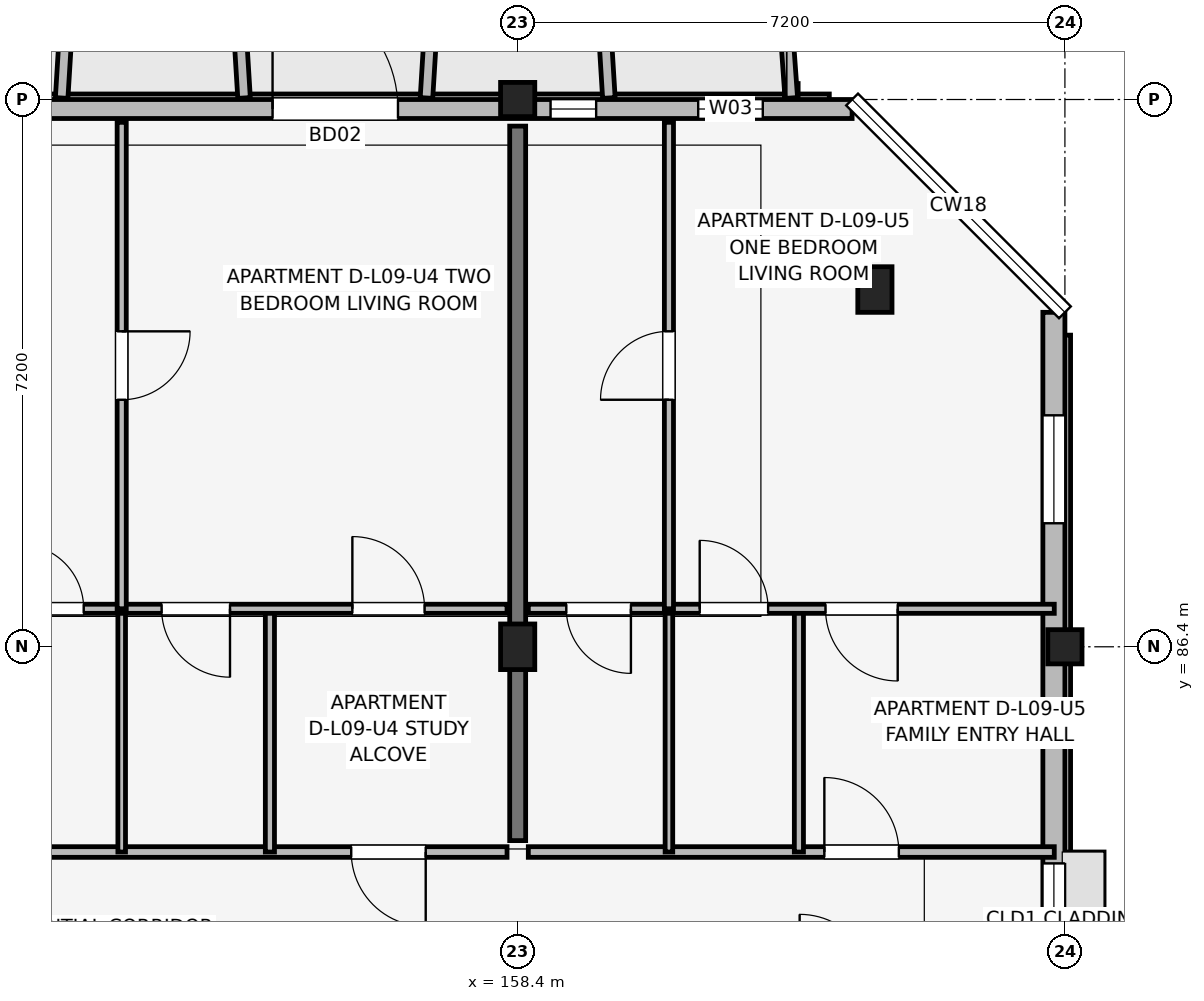
"""IFC4 building model, lengths in metres.
Left out: names, types, materials, properties, quantities, classifications, styles, units other than length and angle.
Written with IfcOpenShell. Run it as: python <this file> out.ifc"""

import sys

from ifc_helpers import new_model, si_unit, direction, frame, frame_2d, origin, origin_2d, place, context, subcontext, project, spatial, rectangle, extrude, element, fill, save


model = new_model("IFC4")
c1 = context("Model", 3, precision=1e-05, world=origin(), true_north=direction((0.0, 1.0)))
c2 = subcontext(c1, "Body", "Model", "MODEL_VIEW")
j1 = project(units=[si_unit("LENGTHUNIT", "METRE"), si_unit("PLANEANGLEUNIT", "RADIAN")], contexts=[c1])
p1 = place(None, origin())
s1 = spatial("IfcSite", under=j1, at=p1, CompositionType="ELEMENT")
p2 = place(p1, origin())
s2 = spatial("IfcBuilding", under=s1, at=p2, CompositionType="ELEMENT")
p3 = place(p2, frame((0.0, 0.0, 30.75)))
s3 = spatial("IfcBuildingStorey", under=s2, at=p3, CompositionType="ELEMENT", Elevation=30.75)
p4 = place(p3, frame((158.4, 86.4, 0.0), z_axis=(0.0, 0.0, 1.0), x_axis=(1.0, 0.0, 0.0)))
e1 = element("IfcColumn", 1, at=p4, inside=s3, PredefinedType="COLUMN", context=c2, shape_type="SweptSolid", body=[
    extrude(rectangle(XDim=0.45, YDim=0.6, at=origin_2d()), origin(), (0.0, 0.0, 1.0), 3.15),
])
for number, where, z_axis, x_axis in (
    (2, (158.4, 93.6, 0.0), (0.0, 0.0, 1.0), (1.0, 0.0, 0.0)),
    (3, (165.6, 86.4, 0.0), (0.0, 0.0, 1.0), (1.0, 0.0, 0.0)),
):
    element("IfcColumn", number, at=place(p3, frame(where, z_axis=z_axis, x_axis=x_axis)), inside=s3, PredefinedType="COLUMN", context=c2, shape_type="SweptSolid", body=[
        extrude(rectangle(XDim=0.45, YDim=0.45, at=origin_2d()), origin(), (0.0, 0.0, 1.0), 3.15),
    ])
p5 = place(p3, frame((163.1, 91.1, 0.0), z_axis=(0.0, 0.0, 1.0), x_axis=(1.0, 0.0, 0.0)))
e4 = element("IfcColumn", 4, at=p5, inside=s3, PredefinedType="COLUMN", context=c2, shape_type="SweptSolid", body=[
    extrude(rectangle(XDim=0.45, YDim=0.6, at=origin_2d()), origin(), (0.0, 0.0, 1.0), 3.15),
])
p6 = place(p3, frame((158.4, 83.85, 0.0), z_axis=(0.0, 0.0, 1.0), x_axis=(0.0, 1.0, 0.0)))
e5 = element("IfcWall", 5, at=p6, inside=s3, PredefinedType="SHEAR", context=c2, shape_type="SweptSolid", body=[
    extrude(rectangle(XDim=9.4, YDim=0.21, at=frame_2d((4.7, 0.0))), origin(), (0.0, 0.0, 1.0), 3.15),
])
p7 = place(p3, frame((165.455, 74.8, 0.0), z_axis=(0.0, 0.0, 1.0), x_axis=(0.0, 1.0, 0.0)))
e6 = element("IfcWall", 6, at=p7, inside=s3, PredefinedType="SOLIDWALL", context=c2, shape_type="SweptSolid", body=[
    extrude(rectangle(XDim=16.0, YDim=0.29, at=frame_2d((8.0, 0.0))), origin(), (0.0, 0.0, 1.0), 2.48),
])
p8 = place(p7, frame((7.25, 0.0, 1.05)))
e7 = element("IfcOpeningElement", 7, at=p8, cuts=e6, PredefinedType="OPENING", context=c2, shape_type="SweptSolid", body=[
    extrude(rectangle(XDim=1.5, YDim=1.15, at=frame_2d((0.75, 0.575))), frame((0.0, 0.155, 0.0), z_axis=(0.0, -1.0, 0.0), x_axis=(1.0, 0.0, 0.0)), (0.0, 0.0, 1.0), 0.31),
])
p9 = place(p7, frame((13.225, 0.0, 0.75)))
e8 = element("IfcOpeningElement", 8, at=p9, cuts=e6, PredefinedType="OPENING", context=c2, shape_type="SweptSolid", body=[
    extrude(rectangle(XDim=1.42, YDim=1.6, at=frame_2d((0.71, 0.8))), frame((0.0, 0.155, 0.0), z_axis=(0.0, -1.0, 0.0), x_axis=(1.0, 0.0, 0.0)), (0.0, 0.0, 1.0), 0.31),
])
p10 = place(p3, frame((162.8, 93.475, 0.0), z_axis=(0.0, 0.0, 1.0), x_axis=(-1.0, 0.0, 0.0)))
e9 = element("IfcWall", 9, at=p10, inside=s3, PredefinedType="SOLIDWALL", context=c2, shape_type="SweptSolid", body=[
    extrude(rectangle(XDim=30.4, YDim=0.25, at=frame_2d((15.2, 0.0))), origin(), (0.0, 0.0, 1.0), 2.48),
])
p11 = place(p10, frame((22.1, 0.0, 0.0), z_axis=(0.0, 0.0, 1.0), x_axis=(-1.0, 0.0, 0.0)))
e10 = element("IfcOpeningElement", 10, at=p11, cuts=e9, PredefinedType="OPENING", context=c2, shape_type="SweptSolid", body=[
    extrude(rectangle(XDim=1.8, YDim=2.15, at=frame_2d((0.9, 1.075))), frame((0.0, 0.135, 0.0), z_axis=(0.0, -1.0, 0.0), x_axis=(1.0, 0.0, 0.0)), (0.0, 0.0, 1.0), 0.27),
])
p12 = place(p10, frame((7.625, 0.0, 0.0), z_axis=(0.0, 0.0, 1.0), x_axis=(-1.0, 0.0, 0.0)))
e11 = element("IfcOpeningElement", 11, at=p12, cuts=e9, PredefinedType="OPENING", context=c2, shape_type="SweptSolid", body=[
    extrude(rectangle(XDim=1.65, YDim=2.15, at=frame_2d((0.825, 1.075))), frame((0.0, 0.135, 0.0), z_axis=(0.0, -1.0, 0.0), x_axis=(1.0, 0.0, 0.0)), (0.0, 0.0, 1.0), 0.27),
])
p13 = place(p10, frame((27.97, 0.0, 0.7)))
e12 = element("IfcOpeningElement", 12, at=p13, cuts=e9, PredefinedType="OPENING", context=c2, shape_type="SweptSolid", body=[
    extrude(rectangle(XDim=1.46, YDim=1.55, at=frame_2d((0.73, 0.775))), frame((0.0, 0.135, 0.0), z_axis=(0.0, -1.0, 0.0), x_axis=(1.0, 0.0, 0.0)), (0.0, 0.0, 1.0), 0.27),
])
p14 = place(p10, frame((26.433, 0.0, 0.75)))
e13 = element("IfcOpeningElement", 13, at=p14, cuts=e9, PredefinedType="OPENING", context=c2, shape_type="SweptSolid", body=[
    extrude(rectangle(XDim=0.6, YDim=1.25, at=frame_2d((0.3, 0.625))), frame((0.0, 0.135, 0.0), z_axis=(0.0, -1.0, 0.0), x_axis=(1.0, 0.0, 0.0)), (0.0, 0.0, 1.0), 0.27),
])
p15 = place(p10, frame((24.968, 0.0, 0.75)))
e14 = element("IfcOpeningElement", 14, at=p15, cuts=e9, PredefinedType="OPENING", context=c2, shape_type="SweptSolid", body=[
    extrude(rectangle(XDim=0.6, YDim=1.25, at=frame_2d((0.3, 0.625))), frame((0.0, 0.135, 0.0), z_axis=(0.0, -1.0, 0.0), x_axis=(1.0, 0.0, 0.0)), (0.0, 0.0, 1.0), 0.27),
])
p16 = place(p10, frame((15.61, 0.0, 0.7)))
e15 = element("IfcOpeningElement", 15, at=p16, cuts=e9, PredefinedType="OPENING", context=c2, shape_type="SweptSolid", body=[
    extrude(rectangle(XDim=1.58, YDim=1.6, at=frame_2d((0.79, 0.8))), frame((0.0, 0.135, 0.0), z_axis=(0.0, -1.0, 0.0), x_axis=(1.0, 0.0, 0.0)), (0.0, 0.0, 1.0), 0.27),
])
p17 = place(p10, frame((12.945, 0.0, 0.75)))
e16 = element("IfcOpeningElement", 16, at=p17, cuts=e9, PredefinedType="OPENING", context=c2, shape_type="SweptSolid", body=[
    extrude(rectangle(XDim=1.46, YDim=1.55, at=frame_2d((0.73, 0.775))), frame((0.0, 0.135, 0.0), z_axis=(0.0, -1.0, 0.0), x_axis=(1.0, 0.0, 0.0)), (0.0, 0.0, 1.0), 0.27),
])
p18 = place(p10, frame((10.567, 0.0, 0.75)))
e17 = element("IfcOpeningElement", 17, at=p18, cuts=e9, PredefinedType="OPENING", context=c2, shape_type="SweptSolid", body=[
    extrude(rectangle(XDim=0.6, YDim=1.25, at=frame_2d((0.3, 0.625))), frame((0.0, 0.135, 0.0), z_axis=(0.0, -1.0, 0.0), x_axis=(1.0, 0.0, 0.0)), (0.0, 0.0, 1.0), 0.27),
])
p19 = place(p10, frame((3.367, 0.0, 0.75)))
e18 = element("IfcOpeningElement", 18, at=p19, cuts=e9, PredefinedType="OPENING", context=c2, shape_type="SweptSolid", body=[
    extrude(rectangle(XDim=0.6, YDim=1.25, at=frame_2d((0.3, 0.625))), frame((0.0, 0.135, 0.0), z_axis=(0.0, -1.0, 0.0), x_axis=(1.0, 0.0, 0.0)), (0.0, 0.0, 1.0), 0.27),
])
p20 = place(p10, frame((1.175, 0.0, 0.75)))
e19 = element("IfcOpeningElement", 19, at=p20, cuts=e9, PredefinedType="OPENING", context=c2, shape_type="SweptSolid", body=[
    extrude(rectangle(XDim=0.85, YDim=1.4, at=frame_2d((0.425, 0.7))), frame((0.0, 0.135, 0.0), z_axis=(0.0, -1.0, 0.0), x_axis=(1.0, 0.0, 0.0)), (0.0, 0.0, 1.0), 0.27),
])
for number, where, z_axis, x_axis in (
    (20, (152.4, 93.62, 0.0), (0.0, 0.0, 1.0), (0.061, 0.998, 0.0)),
    (21, (154.8, 93.62, 0.0), (0.0, 0.0, 1.0), (-0.061, 0.998, 0.0)),
    (22, (157.2, 93.62, 0.0), (0.0, 0.0, 1.0), (0.061, 0.998, 0.0)),
):
    element("IfcWall", number, at=place(p3, frame(where, z_axis=z_axis, x_axis=x_axis)), inside=s3, PredefinedType="ELEMENTEDWALL", context=c2, shape_type="SweptSolid", body=[
        extrude(rectangle(XDim=1.964, YDim=0.165, at=frame_2d((0.982, 0.0))), origin(), (0.0, 0.0, 1.0), 2.58),
    ])
p21 = place(p3, frame((159.6, 93.62, 0.0), z_axis=(0.0, 0.0, 1.0), x_axis=(-0.061170732449, 0.998127317276, 0.0)))
e23 = element("IfcWall", 23, at=p21, inside=s3, PredefinedType="ELEMENTEDWALL", context=c2, shape_type="SweptSolid", body=[
    extrude(rectangle(XDim=1.964, YDim=0.165, at=frame_2d((0.982, 0.0))), origin(), (0.0, 0.0, 1.0), 2.95),
])
p22 = place(p3, frame((162.0, 93.62, 0.0), z_axis=(0.0, 0.0, 1.0), x_axis=(-0.071194071069, 0.997462482625, 0.0)))
e24 = element("IfcWall", 24, at=p22, inside=s3, PredefinedType="ELEMENTEDWALL", context=c2, shape_type="SweptSolid", body=[
    extrude(rectangle(XDim=1.965, YDim=0.165, at=frame_2d((0.982, 0.0))), origin(), (0.0, 0.0, 1.0), 2.95),
])
p23 = place(p3, frame((151.34, 83.7, 0.0), z_axis=(0.0, 0.0, 1.0), x_axis=(1.0, 0.0, 0.0)))
e25 = element("IfcWall", 25, at=p23, inside=s3, PredefinedType="PARTITIONING", context=c2, shape_type="SweptSolid", body=[
    extrude(rectangle(XDim=6.92, YDim=0.14, at=frame_2d((3.46, 0.0))), origin(), (0.0, 0.0, 1.0), 2.38),
])
p24 = place(p23, frame((5.85, 0.0, 0.0), z_axis=(0.0, 0.0, 1.0), x_axis=(-1.0, 0.0, 0.0)))
e26 = element("IfcOpeningElement", 26, at=p24, cuts=e25, PredefinedType="OPENING", context=c2, shape_type="SweptSolid", body=[
    extrude(rectangle(XDim=0.98, YDim=2.1, at=frame_2d((0.49, 1.05))), frame((0.0, 0.08, 0.0), z_axis=(0.0, -1.0, 0.0), x_axis=(1.0, 0.0, 0.0)), (0.0, 0.0, 1.0), 0.16),
])
p25 = place(p3, frame((153.19, 83.7, 0.0), z_axis=(0.0, 0.0, 1.0), x_axis=(0.0, 1.0, 0.0)))
e27 = element("IfcWall", 27, at=p25, inside=s3, PredefinedType="PARTITIONING", context=c2, shape_type="SweptSolid", body=[
    extrude(rectangle(XDim=3.2, YDim=0.1, at=frame_2d((1.6, 0.0))), origin(), (0.0, 0.0, 1.0), 2.38),
])
p26 = place(p3, frame((155.14, 83.7, 0.0), z_axis=(0.0, 0.0, 1.0), x_axis=(0.0, 1.0, 0.0)))
e28 = element("IfcWall", 28, at=p26, inside=s3, PredefinedType="PARTITIONING", context=c2, shape_type="SweptSolid", body=[
    extrude(rectangle(XDim=3.2, YDim=0.12, at=frame_2d((1.6, 0.0))), origin(), (0.0, 0.0, 1.0), 2.38),
])
p27 = place(p3, frame((151.34, 86.9, 0.0), z_axis=(0.0, 0.0, 1.0), x_axis=(1.0, 0.0, 0.0)))
e29 = element("IfcWall", 29, at=p27, inside=s3, PredefinedType="PARTITIONING", context=c2, shape_type="SweptSolid", body=[
    extrude(rectangle(XDim=6.92, YDim=0.12, at=frame_2d((3.46, 0.0))), origin(), (0.0, 0.0, 1.0), 2.38),
])
p28 = place(p27, frame((0.5, 0.0, 0.0)))
e30 = element("IfcOpeningElement", 30, at=p28, cuts=e29, PredefinedType="OPENING", context=c2, shape_type="SweptSolid", body=[
    extrude(rectangle(XDim=0.85, YDim=2.08, at=frame_2d((0.425, 1.04))), frame((0.0, 0.07, 0.0), z_axis=(0.0, -1.0, 0.0), x_axis=(1.0, 0.0, 0.0)), (0.0, 0.0, 1.0), 0.14),
])
p29 = place(p27, frame((3.275, 0.0, 0.0), z_axis=(0.0, 0.0, 1.0), x_axis=(-1.0, 0.0, 0.0)))
e31 = element("IfcOpeningElement", 31, at=p29, cuts=e29, PredefinedType="OPENING", context=c2, shape_type="SweptSolid", body=[
    extrude(rectangle(XDim=0.9, YDim=2.08, at=frame_2d((0.45, 1.04))), frame((0.0, 0.07, 0.0), z_axis=(0.0, -1.0, 0.0), x_axis=(1.0, 0.0, 0.0)), (0.0, 0.0, 1.0), 0.14),
])
p30 = place(p27, frame((4.885, 0.0, 0.0)))
e32 = element("IfcOpeningElement", 32, at=p30, cuts=e29, PredefinedType="OPENING", context=c2, shape_type="SweptSolid", body=[
    extrude(rectangle(XDim=0.95, YDim=2.08, at=frame_2d((0.475, 1.04))), frame((0.0, 0.07, 0.0), z_axis=(0.0, -1.0, 0.0), x_axis=(1.0, 0.0, 0.0)), (0.0, 0.0, 1.0), 0.14),
])
p31 = place(p3, frame((153.19, 86.9, 0.0), z_axis=(0.0, 0.0, 1.0), x_axis=(0.0, 1.0, 0.0)))
e33 = element("IfcWall", 33, at=p31, inside=s3, PredefinedType="PARTITIONING", context=c2, shape_type="SweptSolid", body=[
    extrude(rectangle(XDim=6.4, YDim=0.12, at=frame_2d((3.2, 0.0))), origin(), (0.0, 0.0, 1.0), 2.38),
])
p32 = place(p31, frame((3.65, 0.0, 0.0), z_axis=(0.0, 0.0, 1.0), x_axis=(-1.0, 0.0, 0.0)))
e34 = element("IfcOpeningElement", 34, at=p32, cuts=e33, PredefinedType="OPENING", context=c2, shape_type="SweptSolid", body=[
    extrude(rectangle(XDim=0.9, YDim=2.08, at=frame_2d((0.45, 1.04))), frame((0.0, 0.07, 0.0), z_axis=(0.0, -1.0, 0.0), x_axis=(1.0, 0.0, 0.0)), (0.0, 0.0, 1.0), 0.14),
])
p33 = place(p3, frame((158.54, 83.7, 0.0), z_axis=(0.0, 0.0, 1.0), x_axis=(1.0, 0.0, 0.0)))
e35 = element("IfcWall", 35, at=p33, inside=s3, PredefinedType="PARTITIONING", context=c2, shape_type="SweptSolid", body=[
    extrude(rectangle(XDim=6.92, YDim=0.14, at=frame_2d((3.46, 0.0))), origin(), (0.0, 0.0, 1.0), 2.38),
])
p34 = place(p33, frame((3.895, 0.0, 0.0)))
e36 = element("IfcOpeningElement", 36, at=p34, cuts=e35, PredefinedType="OPENING", context=c2, shape_type="SweptSolid", body=[
    extrude(rectangle(XDim=0.98, YDim=2.1, at=frame_2d((0.49, 1.05))), frame((0.0, 0.08, 0.0), z_axis=(0.0, -1.0, 0.0), x_axis=(1.0, 0.0, 0.0)), (0.0, 0.0, 1.0), 0.16),
])
p35 = place(p3, frame((160.39, 83.7, 0.0), z_axis=(0.0, 0.0, 1.0), x_axis=(0.0, 1.0, 0.0)))
e37 = element("IfcWall", 37, at=p35, inside=s3, PredefinedType="PARTITIONING", context=c2, shape_type="SweptSolid", body=[
    extrude(rectangle(XDim=3.2, YDim=0.1, at=frame_2d((1.6, 0.0))), origin(), (0.0, 0.0, 1.0), 2.38),
])
p36 = place(p3, frame((162.1, 83.7, 0.0), z_axis=(0.0, 0.0, 1.0), x_axis=(0.0, 1.0, 0.0)))
e38 = element("IfcWall", 38, at=p36, inside=s3, PredefinedType="PARTITIONING", context=c2, shape_type="SweptSolid", body=[
    extrude(rectangle(XDim=3.2, YDim=0.12, at=frame_2d((1.6, 0.0))), origin(), (0.0, 0.0, 1.0), 2.38),
])
p37 = place(p3, frame((158.54, 86.9, 0.0), z_axis=(0.0, 0.0, 1.0), x_axis=(1.0, 0.0, 0.0)))
e39 = element("IfcWall", 39, at=p37, inside=s3, PredefinedType="PARTITIONING", context=c2, shape_type="SweptSolid", body=[
    extrude(rectangle(XDim=6.92, YDim=0.12, at=frame_2d((3.46, 0.0))), origin(), (0.0, 0.0, 1.0), 2.38),
])
p38 = place(p37, frame((1.35, 0.0, 0.0), z_axis=(0.0, 0.0, 1.0), x_axis=(-1.0, 0.0, 0.0)))
e40 = element("IfcOpeningElement", 40, at=p38, cuts=e39, PredefinedType="OPENING", context=c2, shape_type="SweptSolid", body=[
    extrude(rectangle(XDim=0.85, YDim=2.08, at=frame_2d((0.425, 1.04))), frame((0.0, 0.07, 0.0), z_axis=(0.0, -1.0, 0.0), x_axis=(1.0, 0.0, 0.0)), (0.0, 0.0, 1.0), 0.14),
])
p39 = place(p37, frame((2.255, 0.0, 0.0)))
e41 = element("IfcOpeningElement", 41, at=p39, cuts=e39, PredefinedType="OPENING", context=c2, shape_type="SweptSolid", body=[
    extrude(rectangle(XDim=0.9, YDim=2.08, at=frame_2d((0.45, 1.04))), frame((0.0, 0.07, 0.0), z_axis=(0.0, -1.0, 0.0), x_axis=(1.0, 0.0, 0.0)), (0.0, 0.0, 1.0), 0.14),
])
p40 = place(p37, frame((4.86, 0.0, 0.0), z_axis=(0.0, 0.0, 1.0), x_axis=(-1.0, 0.0, 0.0)))
e42 = element("IfcOpeningElement", 42, at=p40, cuts=e39, PredefinedType="OPENING", context=c2, shape_type="SweptSolid", body=[
    extrude(rectangle(XDim=0.95, YDim=2.08, at=frame_2d((0.475, 1.04))), frame((0.0, 0.07, 0.0), z_axis=(0.0, -1.0, 0.0), x_axis=(1.0, 0.0, 0.0)), (0.0, 0.0, 1.0), 0.14),
])
p41 = place(p3, frame((160.39, 86.9, 0.0), z_axis=(0.0, 0.0, 1.0), x_axis=(0.0, 1.0, 0.0)))
e43 = element("IfcWall", 43, at=p41, inside=s3, PredefinedType="PARTITIONING", context=c2, shape_type="SweptSolid", body=[
    extrude(rectangle(XDim=6.4, YDim=0.12, at=frame_2d((3.2, 0.0))), origin(), (0.0, 0.0, 1.0), 2.38),
])
p42 = place(p41, frame((2.75, 0.0, 0.0)))
e44 = element("IfcOpeningElement", 44, at=p42, cuts=e43, PredefinedType="OPENING", context=c2, shape_type="SweptSolid", body=[
    extrude(rectangle(XDim=0.9, YDim=2.08, at=frame_2d((0.45, 1.04))), frame((0.0, 0.07, 0.0), z_axis=(0.0, -1.0, 0.0), x_axis=(1.0, 0.0, 0.0)), (0.0, 0.0, 1.0), 0.14),
])
p43 = place(p12, origin())
e45 = element("IfcDoor", 45, at=p43, inside=s3, OperationType="SINGLE_SWING_RIGHT", PredefinedType="DOOR", context=c2, shape_type="SweptSolid", body=[
    extrude(rectangle(XDim=1.65, YDim=2.15, at=frame_2d((0.825, 1.075))), frame((0.0, 0.025, 0.0), z_axis=(0.0, -1.0, 0.0), x_axis=(1.0, 0.0, 0.0)), (0.0, 0.0, 1.0), 0.05),
])
fill(e11, e45)
p44 = place(p19, origin())
e46 = element("IfcWindow", 46, at=p44, inside=s3, PartitioningType="SINGLE_PANEL", PredefinedType="WINDOW", context=c2, shape_type="SweptSolid", body=[
    extrude(rectangle(XDim=0.6, YDim=1.25, at=frame_2d((0.3, 0.625))), frame((0.0, 0.03, 0.0), z_axis=(0.0, -1.0, 0.0), x_axis=(1.0, 0.0, 0.0)), (0.0, 0.0, 1.0), 0.06),
])
fill(e18, e46)
p45 = place(p20, origin())
e47 = element("IfcWindow", 47, at=p45, inside=s3, PartitioningType="SINGLE_PANEL", PredefinedType="WINDOW", context=c2, shape_type="SweptSolid", body=[
    extrude(rectangle(XDim=0.85, YDim=1.4, at=frame_2d((0.425, 0.7))), frame((0.0, 0.03, 0.0), z_axis=(0.0, -1.0, 0.0), x_axis=(1.0, 0.0, 0.0)), (0.0, 0.0, 1.0), 0.06),
])
fill(e19, e47)
p46 = place(p8, origin())
e48 = element("IfcWindow", 48, at=p46, inside=s3, PartitioningType="SINGLE_PANEL", PredefinedType="WINDOW", context=c2, shape_type="SweptSolid", body=[
    extrude(rectangle(XDim=1.5, YDim=1.15, at=frame_2d((0.75, 0.575))), frame((0.0, 0.03, 0.0), z_axis=(0.0, -1.0, 0.0), x_axis=(1.0, 0.0, 0.0)), (0.0, 0.0, 1.0), 0.06),
])
fill(e7, e48)
p47 = place(p9, origin())
e49 = element("IfcWindow", 49, at=p47, inside=s3, PartitioningType="SINGLE_PANEL", PredefinedType="WINDOW", context=c2, shape_type="SweptSolid", body=[
    extrude(rectangle(XDim=1.42, YDim=1.6, at=frame_2d((0.71, 0.8))), frame((0.0, 0.03, 0.0), z_axis=(0.0, -1.0, 0.0), x_axis=(1.0, 0.0, 0.0)), (0.0, 0.0, 1.0), 0.06),
])
fill(e8, e49)
p48 = place(p24, origin())
e50 = element("IfcDoor", 50, at=p48, inside=s3, OperationType="SINGLE_SWING_RIGHT", PredefinedType="DOOR", context=c2, shape_type="SweptSolid", body=[
    extrude(rectangle(XDim=0.98, YDim=2.1, at=frame_2d((0.49, 1.05))), frame((0.0, 0.025, 0.0), z_axis=(0.0, -1.0, 0.0), x_axis=(1.0, 0.0, 0.0)), (0.0, 0.0, 1.0), 0.05),
])
fill(e26, e50)
p49 = place(p28, origin())
e51 = element("IfcDoor", 51, at=p49, inside=s3, OperationType="SINGLE_SWING_LEFT", PredefinedType="DOOR", context=c2, shape_type="SweptSolid", body=[
    extrude(rectangle(XDim=0.85, YDim=2.08, at=frame_2d((0.425, 1.04))), frame((0.0, 0.025, 0.0), z_axis=(0.0, -1.0, 0.0), x_axis=(1.0, 0.0, 0.0)), (0.0, 0.0, 1.0), 0.05),
])
fill(e30, e51)
p50 = place(p29, origin())
e52 = element("IfcDoor", 52, at=p50, inside=s3, OperationType="SINGLE_SWING_RIGHT", PredefinedType="DOOR", context=c2, shape_type="SweptSolid", body=[
    extrude(rectangle(XDim=0.9, YDim=2.08, at=frame_2d((0.45, 1.04))), frame((0.0, 0.025, 0.0), z_axis=(0.0, -1.0, 0.0), x_axis=(1.0, 0.0, 0.0)), (0.0, 0.0, 1.0), 0.05),
])
fill(e31, e52)
p51 = place(p30, origin())
e53 = element("IfcDoor", 53, at=p51, inside=s3, OperationType="SINGLE_SWING_LEFT", PredefinedType="DOOR", context=c2, shape_type="SweptSolid", body=[
    extrude(rectangle(XDim=0.95, YDim=2.08, at=frame_2d((0.475, 1.04))), frame((0.0, 0.025, 0.0), z_axis=(0.0, -1.0, 0.0), x_axis=(1.0, 0.0, 0.0)), (0.0, 0.0, 1.0), 0.05),
])
fill(e32, e53)
p52 = place(p32, origin())
e54 = element("IfcDoor", 54, at=p52, inside=s3, OperationType="SINGLE_SWING_RIGHT", PredefinedType="DOOR", context=c2, shape_type="SweptSolid", body=[
    extrude(rectangle(XDim=0.9, YDim=2.08, at=frame_2d((0.45, 1.04))), frame((0.0, 0.025, 0.0), z_axis=(0.0, -1.0, 0.0), x_axis=(1.0, 0.0, 0.0)), (0.0, 0.0, 1.0), 0.05),
])
fill(e34, e54)
p53 = place(p34, origin())
e55 = element("IfcDoor", 55, at=p53, inside=s3, OperationType="SINGLE_SWING_LEFT", PredefinedType="DOOR", context=c2, shape_type="SweptSolid", body=[
    extrude(rectangle(XDim=0.98, YDim=2.1, at=frame_2d((0.49, 1.05))), frame((0.0, 0.025, 0.0), z_axis=(0.0, -1.0, 0.0), x_axis=(1.0, 0.0, 0.0)), (0.0, 0.0, 1.0), 0.05),
])
fill(e36, e55)
p54 = place(p38, origin())
e56 = element("IfcDoor", 56, at=p54, inside=s3, OperationType="SINGLE_SWING_RIGHT", PredefinedType="DOOR", context=c2, shape_type="SweptSolid", body=[
    extrude(rectangle(XDim=0.85, YDim=2.08, at=frame_2d((0.425, 1.04))), frame((0.0, 0.025, 0.0), z_axis=(0.0, -1.0, 0.0), x_axis=(1.0, 0.0, 0.0)), (0.0, 0.0, 1.0), 0.05),
])
fill(e40, e56)
p55 = place(p39, origin())
e57 = element("IfcDoor", 57, at=p55, inside=s3, OperationType="SINGLE_SWING_LEFT", PredefinedType="DOOR", context=c2, shape_type="SweptSolid", body=[
    extrude(rectangle(XDim=0.9, YDim=2.08, at=frame_2d((0.45, 1.04))), frame((0.0, 0.025, 0.0), z_axis=(0.0, -1.0, 0.0), x_axis=(1.0, 0.0, 0.0)), (0.0, 0.0, 1.0), 0.05),
])
fill(e41, e57)
p56 = place(p40, origin())
e58 = element("IfcDoor", 58, at=p56, inside=s3, OperationType="SINGLE_SWING_RIGHT", PredefinedType="DOOR", context=c2, shape_type="SweptSolid", body=[
    extrude(rectangle(XDim=0.95, YDim=2.08, at=frame_2d((0.475, 1.04))), frame((0.0, 0.025, 0.0), z_axis=(0.0, -1.0, 0.0), x_axis=(1.0, 0.0, 0.0)), (0.0, 0.0, 1.0), 0.05),
])
fill(e42, e58)
p57 = place(p42, origin())
e59 = element("IfcDoor", 59, at=p57, inside=s3, OperationType="SINGLE_SWING_LEFT", PredefinedType="DOOR", context=c2, shape_type="SweptSolid", body=[
    extrude(rectangle(XDim=0.9, YDim=2.08, at=frame_2d((0.45, 1.04))), frame((0.0, 0.025, 0.0), z_axis=(0.0, -1.0, 0.0), x_axis=(1.0, 0.0, 0.0)), (0.0, 0.0, 1.0), 0.05),
])
fill(e44, e59)
save(model, sys.argv[1])
